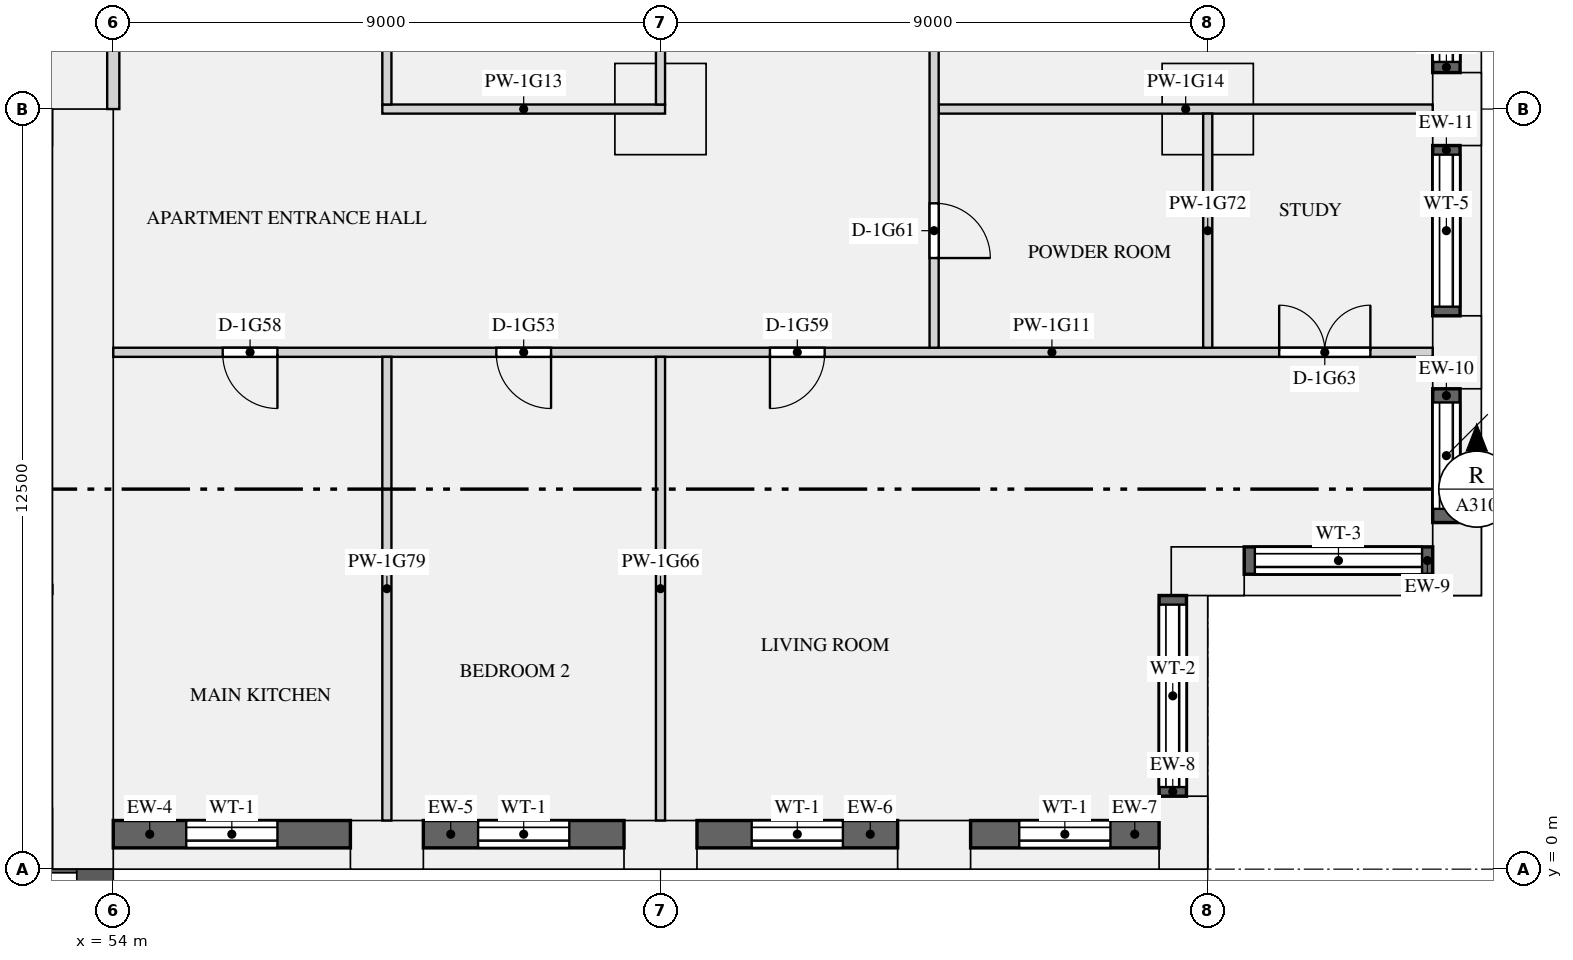
"""IFC4 building model, lengths in metres.
Left out: names, types, materials, properties, quantities, classifications, styles, units other than length and angle.
Written with IfcOpenShell. Run it as: python <this file> out.ifc"""

import sys

from ifc_helpers import new_model, si_unit, direction, frame, frame_2d, origin, origin_2d, place, context, subcontext, project, spatial, rectangle, extrude, element, fill, save


model = new_model("IFC4")
c1 = context("Model", 3, precision=1e-05, world=origin(), true_north=direction((0.0, 1.0)))
c2 = subcontext(c1, "Body", "Model", "MODEL_VIEW")
j1 = project(units=[si_unit("LENGTHUNIT", "METRE"), si_unit("PLANEANGLEUNIT", "RADIAN")], contexts=[c1])
p1 = place(None, origin())
s1 = spatial("IfcSite", under=j1, at=p1, CompositionType="ELEMENT")
p2 = place(p1, origin())
s2 = spatial("IfcBuilding", under=s1, at=p2, CompositionType="ELEMENT")
p3 = place(p2, frame((0.0, 0.0, 69.9)))
s3 = spatial("IfcBuildingStorey", under=s2, at=p3, CompositionType="ELEMENT", Elevation=69.9)
for number, where, z_axis, x_axis in (
    (1, (58.5, 0.4, 0.0), (0.0, 0.0, 1.0), (1.0, 0.0, 0.0)),
    (2, (63.0, 0.4, 0.0), (0.0, 0.0, 1.0), (1.0, 0.0, 0.0)),
    (3, (67.5, 0.4, 0.0), (0.0, 0.0, 1.0), (1.0, 0.0, 0.0)),
    (4, (71.6, 0.6, 0.0), (0.0, 0.0, 1.0), (0.0, 1.0, 0.0)),
    (5, (72.0, 4.9, 0.0), (0.0, 0.0, 1.0), (1.0, 0.0, 0.0)),
    (6, (76.1, 5.1, 0.0), (0.0, 0.0, 1.0), (0.0, 1.0, 0.0)),
    (7, (76.1, 8.5, 0.0), (0.0, 0.0, 1.0), (0.0, 1.0, 0.0)),
    (8, (76.1, 12.5, 0.0), (0.0, 0.0, 1.0), (0.0, 1.0, 0.0)),
):
    element("IfcColumn", number, at=place(p3, frame(where, z_axis=z_axis, x_axis=x_axis)), inside=s3, PredefinedType="USERDEFINED", context=c2, shape_type="SweptSolid", body=[
        extrude(rectangle(XDim=1.2, YDim=0.8, at=origin_2d()), origin(), (0.0, 0.0, 1.0), 3.15),
    ])
for number, where, z_axis, x_axis in (
    (9, (63.0, 12.5, 0.0), (0.0, 0.0, 1.0), (1.0, 0.0, 0.0)),
    (10, (72.0, 12.5, 0.0), (0.0, 0.0, 1.0), (1.0, 0.0, 0.0)),
):
    element("IfcColumn", number, at=place(p3, frame(where, z_axis=z_axis, x_axis=x_axis)), inside=s3, PredefinedType="COLUMN", context=c2, shape_type="SweptSolid", body=[
        extrude(rectangle(XDim=1.5, YDim=1.5, at=origin_2d()), origin(), (0.0, 0.0, 1.0), 3.15),
    ])
p4 = place(p3, frame((53.5, 0.0, 0.0), z_axis=(0.0, 0.0, 1.0), x_axis=(0.0, 1.0, 0.0)))
e11 = element("IfcWall", 11, at=p4, inside=s3, PredefinedType="SHEAR", context=c2, shape_type="SweptSolid", body=[
    extrude(rectangle(XDim=12.5, YDim=1.0, at=frame_2d((6.25, 0.0))), origin(), (0.0, 0.0, 1.0), 3.15),
])
p5 = place(p3, frame((54.0, 0.575, 0.9), z_axis=(0.0, 0.0, 1.0), x_axis=(1.0, 0.0, 0.0)))
e12 = element("IfcWall", 12, at=p5, inside=s3, PredefinedType="SOLIDWALL", context=c2, shape_type="SweptSolid", body=[
    extrude(rectangle(XDim=3.9, YDim=0.45, at=frame_2d((1.95, 0.0))), origin(), (0.0, 0.0, 1.0), 1.75),
])
p6 = place(p5, frame((1.2, 0.0, 0.15)))
e13 = element("IfcOpeningElement", 13, at=p6, cuts=e12, PredefinedType="OPENING", context=c2, shape_type="SweptSolid", body=[
    extrude(rectangle(XDim=1.5, YDim=1.5, at=frame_2d((0.75, 0.75))), frame((0.0, 0.235, 0.0), z_axis=(0.0, -1.0, 0.0), x_axis=(1.0, 0.0, 0.0)), (0.0, 0.0, 1.0), 0.47),
])
p7 = place(p3, frame((59.1, 0.575, 0.9), z_axis=(0.0, 0.0, 1.0), x_axis=(1.0, 0.0, 0.0)))
e14 = element("IfcWall", 14, at=p7, inside=s3, PredefinedType="SOLIDWALL", context=c2, shape_type="SweptSolid", body=[
    extrude(rectangle(XDim=3.3, YDim=0.45, at=frame_2d((1.65, 0.0))), origin(), (0.0, 0.0, 1.0), 1.75),
])
p8 = place(p7, frame((0.9, 0.0, 0.15)))
e15 = element("IfcOpeningElement", 15, at=p8, cuts=e14, PredefinedType="OPENING", context=c2, shape_type="SweptSolid", body=[
    extrude(rectangle(XDim=1.5, YDim=1.5, at=frame_2d((0.75, 0.75))), frame((0.0, 0.235, 0.0), z_axis=(0.0, -1.0, 0.0), x_axis=(1.0, 0.0, 0.0)), (0.0, 0.0, 1.0), 0.47),
])
p9 = place(p3, frame((63.6, 0.575, 0.9), z_axis=(0.0, 0.0, 1.0), x_axis=(1.0, 0.0, 0.0)))
e16 = element("IfcWall", 16, at=p9, inside=s3, PredefinedType="SOLIDWALL", context=c2, shape_type="SweptSolid", body=[
    extrude(rectangle(XDim=3.3, YDim=0.45, at=frame_2d((1.65, 0.0))), origin(), (0.0, 0.0, 1.0), 1.75),
])
p10 = place(p9, frame((0.9, 0.0, 0.15)))
e17 = element("IfcOpeningElement", 17, at=p10, cuts=e16, PredefinedType="OPENING", context=c2, shape_type="SweptSolid", body=[
    extrude(rectangle(XDim=1.5, YDim=1.5, at=frame_2d((0.75, 0.75))), frame((0.0, 0.235, 0.0), z_axis=(0.0, -1.0, 0.0), x_axis=(1.0, 0.0, 0.0)), (0.0, 0.0, 1.0), 0.47),
])
p11 = place(p3, frame((68.1, 0.575, 0.9), z_axis=(0.0, 0.0, 1.0), x_axis=(1.0, 0.0, 0.0)))
e18 = element("IfcWall", 18, at=p11, inside=s3, PredefinedType="SOLIDWALL", context=c2, shape_type="SweptSolid", body=[
    extrude(rectangle(XDim=3.1, YDim=0.45, at=frame_2d((1.55, 0.0))), origin(), (0.0, 0.0, 1.0), 1.75),
])
p12 = place(p11, frame((0.8, 0.0, 0.15)))
e19 = element("IfcOpeningElement", 19, at=p12, cuts=e18, PredefinedType="OPENING", context=c2, shape_type="SweptSolid", body=[
    extrude(rectangle(XDim=1.5, YDim=1.5, at=frame_2d((0.75, 0.75))), frame((0.0, 0.235, 0.0), z_axis=(0.0, -1.0, 0.0), x_axis=(1.0, 0.0, 0.0)), (0.0, 0.0, 1.0), 0.47),
])
p13 = place(p3, frame((71.425, 1.2, 0.9), z_axis=(0.0, 0.0, 1.0), x_axis=(0.0, 1.0, 0.0)))
e20 = element("IfcWall", 20, at=p13, inside=s3, PredefinedType="SOLIDWALL", context=c2, shape_type="SweptSolid", body=[
    extrude(rectangle(XDim=3.3, YDim=0.45, at=frame_2d((1.65, 0.0))), origin(), (0.0, 0.0, 1.0), 1.75),
])
p14 = place(p13, frame((0.15, 0.0, 0.15)))
e21 = element("IfcOpeningElement", 21, at=p14, cuts=e20, PredefinedType="OPENING", context=c2, shape_type="SweptSolid", body=[
    extrude(rectangle(XDim=3.0, YDim=1.5, at=frame_2d((1.5, 0.75))), frame((0.0, 0.235, 0.0), z_axis=(0.0, -1.0, 0.0), x_axis=(1.0, 0.0, 0.0)), (0.0, 0.0, 1.0), 0.47),
])
p15 = place(p3, frame((72.6, 5.075, 0.9), z_axis=(0.0, 0.0, 1.0), x_axis=(1.0, 0.0, 0.0)))
e22 = element("IfcWall", 22, at=p15, inside=s3, PredefinedType="SOLIDWALL", context=c2, shape_type="SweptSolid", body=[
    extrude(rectangle(XDim=3.1, YDim=0.45, at=frame_2d((1.55, 0.0))), origin(), (0.0, 0.0, 1.0), 1.75),
])
p16 = place(p15, frame((0.175, 0.0, 0.15)))
e23 = element("IfcOpeningElement", 23, at=p16, cuts=e22, PredefinedType="OPENING", context=c2, shape_type="SweptSolid", body=[
    extrude(rectangle(XDim=2.75, YDim=1.5, at=frame_2d((1.375, 0.75))), frame((0.0, 0.235, 0.0), z_axis=(0.0, -1.0, 0.0), x_axis=(1.0, 0.0, 0.0)), (0.0, 0.0, 1.0), 0.47),
])
p17 = place(p3, frame((75.925, 5.7, 0.9), z_axis=(0.0, 0.0, 1.0), x_axis=(0.0, 1.0, 0.0)))
e24 = element("IfcWall", 24, at=p17, inside=s3, PredefinedType="SOLIDWALL", context=c2, shape_type="SweptSolid", body=[
    extrude(rectangle(XDim=2.2, YDim=0.45, at=frame_2d((1.1, 0.0))), origin(), (0.0, 0.0, 1.0), 1.75),
])
p18 = place(p17, frame((0.225, 0.0, 0.15)))
e25 = element("IfcOpeningElement", 25, at=p18, cuts=e24, PredefinedType="OPENING", context=c2, shape_type="SweptSolid", body=[
    extrude(rectangle(XDim=1.75, YDim=1.5, at=frame_2d((0.875, 0.75))), frame((0.0, 0.235, 0.0), z_axis=(0.0, -1.0, 0.0), x_axis=(1.0, 0.0, 0.0)), (0.0, 0.0, 1.0), 0.47),
])
p19 = place(p3, frame((75.925, 9.1, 0.9), z_axis=(0.0, 0.0, 1.0), x_axis=(0.0, 1.0, 0.0)))
e26 = element("IfcWall", 26, at=p19, inside=s3, PredefinedType="SOLIDWALL", context=c2, shape_type="SweptSolid", body=[
    extrude(rectangle(XDim=2.8, YDim=0.45, at=frame_2d((1.4, 0.0))), origin(), (0.0, 0.0, 1.0), 1.75),
])
p20 = place(p19, frame((0.15, 0.0, 0.15)))
e27 = element("IfcOpeningElement", 27, at=p20, cuts=e26, PredefinedType="OPENING", context=c2, shape_type="SweptSolid", body=[
    extrude(rectangle(XDim=2.5, YDim=1.5, at=frame_2d((1.25, 0.75))), frame((0.0, 0.235, 0.0), z_axis=(0.0, -1.0, 0.0), x_axis=(1.0, 0.0, 0.0)), (0.0, 0.0, 1.0), 0.47),
])
p21 = place(p3, frame((75.925, 13.1, 0.9), z_axis=(0.0, 0.0, 1.0), x_axis=(0.0, 1.0, 0.0)))
e28 = element("IfcWall", 28, at=p21, inside=s3, PredefinedType="SOLIDWALL", context=c2, shape_type="SweptSolid", body=[
    extrude(rectangle(XDim=2.6, YDim=0.45, at=frame_2d((1.3, 0.0))), origin(), (0.0, 0.0, 1.0), 1.75),
])
p22 = place(p21, frame((0.175, 0.0, 0.15)))
e29 = element("IfcOpeningElement", 29, at=p22, cuts=e28, PredefinedType="OPENING", context=c2, shape_type="SweptSolid", body=[
    extrude(rectangle(XDim=2.25, YDim=1.5, at=frame_2d((1.125, 0.75))), frame((0.0, 0.235, 0.0), z_axis=(0.0, -1.0, 0.0), x_axis=(1.0, 0.0, 0.0)), (0.0, 0.0, 1.0), 0.47),
])
p23 = place(p3, frame((54.0, 12.5, 0.0), z_axis=(0.0, 0.0, 1.0), x_axis=(0.0, 1.0, 0.0)))
e30 = element("IfcWall", 30, at=p23, inside=s3, PredefinedType="PARTITIONING", context=c2, shape_type="SweptSolid", body=[
    extrude(rectangle(XDim=3.4, YDim=0.2, at=frame_2d((1.7, 0.0))), origin(), (0.0, 0.0, 1.0), 2.65),
])
p24 = place(p3, frame((54.0, 8.5, 0.0), z_axis=(0.0, 0.0, 1.0), x_axis=(1.0, 0.0, 0.0)))
e31 = element("IfcWall", 31, at=p24, inside=s3, PredefinedType="PARTITIONING", context=c2, shape_type="SweptSolid", body=[
    extrude(rectangle(XDim=21.7, YDim=0.15, at=frame_2d((10.85, 0.0))), origin(), (0.0, 0.0, 1.0), 2.65),
])
p25 = place(p24, frame((6.3, 0.0, 0.0)))
e32 = element("IfcOpeningElement", 32, at=p25, cuts=e31, PredefinedType="OPENING", context=c2, shape_type="SweptSolid", body=[
    extrude(rectangle(XDim=0.9, YDim=2.1, at=frame_2d((0.45, 1.05))), frame((0.0, 0.085, 0.0), z_axis=(0.0, -1.0, 0.0), x_axis=(1.0, 0.0, 0.0)), (0.0, 0.0, 1.0), 0.17),
])
p26 = place(p24, frame((1.8, 0.0, 0.0)))
e33 = element("IfcOpeningElement", 33, at=p26, cuts=e31, PredefinedType="OPENING", context=c2, shape_type="SweptSolid", body=[
    extrude(rectangle(XDim=0.9, YDim=2.1, at=frame_2d((0.45, 1.05))), frame((0.0, 0.085, 0.0), z_axis=(0.0, -1.0, 0.0), x_axis=(1.0, 0.0, 0.0)), (0.0, 0.0, 1.0), 0.17),
])
p27 = place(p24, frame((10.8, 0.0, 0.0)))
e34 = element("IfcOpeningElement", 34, at=p27, cuts=e31, PredefinedType="OPENING", context=c2, shape_type="SweptSolid", body=[
    extrude(rectangle(XDim=0.9, YDim=2.1, at=frame_2d((0.45, 1.05))), frame((0.0, 0.085, 0.0), z_axis=(0.0, -1.0, 0.0), x_axis=(1.0, 0.0, 0.0)), (0.0, 0.0, 1.0), 0.17),
])
p28 = place(p24, frame((19.175, 0.0, 0.0)))
e35 = element("IfcOpeningElement", 35, at=p28, cuts=e31, PredefinedType="OPENING", context=c2, shape_type="SweptSolid", body=[
    extrude(rectangle(XDim=1.5, YDim=2.1, at=frame_2d((0.75, 1.05))), frame((0.0, 0.085, 0.0), z_axis=(0.0, -1.0, 0.0), x_axis=(1.0, 0.0, 0.0)), (0.0, 0.0, 1.0), 0.17),
])
p29 = place(p3, frame((58.425, 12.5, 0.0), z_axis=(0.0, 0.0, 1.0), x_axis=(1.0, 0.0, 0.0)))
e36 = element("IfcWall", 36, at=p29, inside=s3, PredefinedType="PARTITIONING", context=c2, shape_type="SweptSolid", body=[
    extrude(rectangle(XDim=4.65, YDim=0.15, at=frame_2d((2.325, 0.0))), origin(), (0.0, 0.0, 1.0), 2.65),
])
p30 = place(p3, frame((67.575, 12.5, 0.0), z_axis=(0.0, 0.0, 1.0), x_axis=(1.0, 0.0, 0.0)))
e37 = element("IfcWall", 37, at=p30, inside=s3, PredefinedType="PARTITIONING", context=c2, shape_type="SweptSolid", body=[
    extrude(rectangle(XDim=8.125, YDim=0.15, at=frame_2d((4.062, 0.0))), origin(), (0.0, 0.0, 1.0), 2.65),
])
p31 = place(p3, frame((63.0, 0.8, 0.0), z_axis=(0.0, 0.0, 1.0), x_axis=(0.0, 1.0, 0.0)))
e38 = element("IfcWall", 38, at=p31, inside=s3, PredefinedType="PARTITIONING", context=c2, shape_type="SweptSolid", body=[
    extrude(rectangle(XDim=7.625, YDim=0.15, at=frame_2d((3.812, 0.0))), origin(), (0.0, 0.0, 1.0), 2.65),
])
p32 = place(p3, frame((63.0, 12.575, 0.0), z_axis=(0.0, 0.0, 1.0), x_axis=(0.0, 1.0, 0.0)))
e39 = element("IfcWall", 39, at=p32, inside=s3, PredefinedType="PARTITIONING", context=c2, shape_type="SweptSolid", body=[
    extrude(rectangle(XDim=15.85, YDim=0.15, at=frame_2d((7.925, 0.0))), origin(), (0.0, 0.0, 1.0), 2.65),
])
p33 = place(p32, frame((6.85, 0.0, 0.0)))
e40 = element("IfcOpeningElement", 40, at=p33, cuts=e39, PredefinedType="OPENING", context=c2, shape_type="SweptSolid", body=[
    extrude(rectangle(XDim=0.9, YDim=2.1, at=frame_2d((0.45, 1.05))), frame((0.0, 0.085, 0.0), z_axis=(0.0, -1.0, 0.0), x_axis=(1.0, 0.0, 0.0)), (0.0, 0.0, 1.0), 0.17),
])
p34 = place(p3, frame((72.0, 8.575, 0.0), z_axis=(0.0, 0.0, 1.0), x_axis=(0.0, 1.0, 0.0)))
e41 = element("IfcWall", 41, at=p34, inside=s3, PredefinedType="PARTITIONING", context=c2, shape_type="SweptSolid", body=[
    extrude(rectangle(XDim=3.85, YDim=0.15, at=frame_2d((1.925, 0.0))), origin(), (0.0, 0.0, 1.0), 2.65),
])
p35 = place(p3, frame((67.5, 8.575, 0.0), z_axis=(0.0, 0.0, 1.0), x_axis=(0.0, 1.0, 0.0)))
e42 = element("IfcWall", 42, at=p35, inside=s3, PredefinedType="PARTITIONING", context=c2, shape_type="SweptSolid", body=[
    extrude(rectangle(XDim=15.35, YDim=0.15, at=frame_2d((7.675, 0.0))), origin(), (0.0, 0.0, 1.0), 2.65),
])
p36 = place(p35, frame((7.475, 0.0, 0.0)))
e43 = element("IfcOpeningElement", 43, at=p36, cuts=e42, PredefinedType="OPENING", context=c2, shape_type="SweptSolid", body=[
    extrude(rectangle(XDim=0.9, YDim=2.1, at=frame_2d((0.45, 1.05))), frame((0.0, 0.085, 0.0), z_axis=(0.0, -1.0, 0.0), x_axis=(1.0, 0.0, 0.0)), (0.0, 0.0, 1.0), 0.17),
])
p37 = place(p35, frame((1.475, 0.0, 0.0)))
e44 = element("IfcOpeningElement", 44, at=p37, cuts=e42, PredefinedType="OPENING", context=c2, shape_type="SweptSolid", body=[
    extrude(rectangle(XDim=0.9, YDim=2.1, at=frame_2d((0.45, 1.05))), frame((0.0, 0.085, 0.0), z_axis=(0.0, -1.0, 0.0), x_axis=(1.0, 0.0, 0.0)), (0.0, 0.0, 1.0), 0.17),
])
p38 = place(p3, frame((58.5, 0.8, 0.0), z_axis=(0.0, 0.0, 1.0), x_axis=(0.0, 1.0, 0.0)))
e45 = element("IfcWall", 45, at=p38, inside=s3, PredefinedType="PARTITIONING", context=c2, shape_type="SweptSolid", body=[
    extrude(rectangle(XDim=7.625, YDim=0.15, at=frame_2d((3.812, 0.0))), origin(), (0.0, 0.0, 1.0), 2.65),
])
p39 = place(p3, frame((58.5, 12.575, 0.0), z_axis=(0.0, 0.0, 1.0), x_axis=(0.0, 1.0, 0.0)))
e46 = element("IfcWall", 46, at=p39, inside=s3, PredefinedType="PARTITIONING", context=c2, shape_type="SweptSolid", body=[
    extrude(rectangle(XDim=10.325, YDim=0.15, at=frame_2d((5.163, 0.0))), origin(), (0.0, 0.0, 1.0), 2.65),
])
p40 = place(p39, frame((1.475, 0.0, 0.0)))
e47 = element("IfcOpeningElement", 47, at=p40, cuts=e46, PredefinedType="OPENING", context=c2, shape_type="SweptSolid", body=[
    extrude(rectangle(XDim=0.9, YDim=2.1, at=frame_2d((0.45, 1.05))), frame((0.0, 0.085, 0.0), z_axis=(0.0, -1.0, 0.0), x_axis=(1.0, 0.0, 0.0)), (0.0, 0.0, 1.0), 0.17),
])
p41 = place(p6, origin())
e48 = element("IfcWindow", 48, at=p41, inside=s3, PartitioningType="SINGLE_PANEL", PredefinedType="WINDOW", context=c2, shape_type="SweptSolid", body=[
    extrude(rectangle(XDim=1.5, YDim=1.5, at=frame_2d((0.75, 0.75))), frame((0.0, -0.065, 0.0), z_axis=(0.0, -1.0, 0.0), x_axis=(1.0, 0.0, 0.0)), (0.0, 0.0, 1.0), 0.06),
])
fill(e13, e48)
p42 = place(p8, origin())
e49 = element("IfcWindow", 49, at=p42, inside=s3, PartitioningType="SINGLE_PANEL", PredefinedType="WINDOW", context=c2, shape_type="SweptSolid", body=[
    extrude(rectangle(XDim=1.5, YDim=1.5, at=frame_2d((0.75, 0.75))), frame((0.0, -0.065, 0.0), z_axis=(0.0, -1.0, 0.0), x_axis=(1.0, 0.0, 0.0)), (0.0, 0.0, 1.0), 0.06),
])
fill(e15, e49)
p43 = place(p10, origin())
e50 = element("IfcWindow", 50, at=p43, inside=s3, PartitioningType="SINGLE_PANEL", PredefinedType="WINDOW", context=c2, shape_type="SweptSolid", body=[
    extrude(rectangle(XDim=1.5, YDim=1.5, at=frame_2d((0.75, 0.75))), frame((0.0, -0.065, 0.0), z_axis=(0.0, -1.0, 0.0), x_axis=(1.0, 0.0, 0.0)), (0.0, 0.0, 1.0), 0.06),
])
fill(e17, e50)
p44 = place(p12, origin())
e51 = element("IfcWindow", 51, at=p44, inside=s3, PartitioningType="SINGLE_PANEL", PredefinedType="WINDOW", context=c2, shape_type="SweptSolid", body=[
    extrude(rectangle(XDim=1.5, YDim=1.5, at=frame_2d((0.75, 0.75))), frame((0.0, -0.065, 0.0), z_axis=(0.0, -1.0, 0.0), x_axis=(1.0, 0.0, 0.0)), (0.0, 0.0, 1.0), 0.06),
])
fill(e19, e51)
p45 = place(p14, origin())
e52 = element("IfcWindow", 52, at=p45, inside=s3, PartitioningType="SINGLE_PANEL", PredefinedType="WINDOW", context=c2, shape_type="SweptSolid", body=[
    extrude(rectangle(XDim=3.0, YDim=1.5, at=frame_2d((1.5, 0.75))), frame((0.0, -0.065, 0.0), z_axis=(0.0, -1.0, 0.0), x_axis=(1.0, 0.0, 0.0)), (0.0, 0.0, 1.0), 0.06),
])
fill(e21, e52)
p46 = place(p16, origin())
e53 = element("IfcWindow", 53, at=p46, inside=s3, PartitioningType="SINGLE_PANEL", PredefinedType="WINDOW", context=c2, shape_type="SweptSolid", body=[
    extrude(rectangle(XDim=2.75, YDim=1.5, at=frame_2d((1.375, 0.75))), frame((0.0, -0.065, 0.0), z_axis=(0.0, -1.0, 0.0), x_axis=(1.0, 0.0, 0.0)), (0.0, 0.0, 1.0), 0.06),
])
fill(e23, e53)
p47 = place(p18, origin())
e54 = element("IfcWindow", 54, at=p47, inside=s3, PartitioningType="SINGLE_PANEL", PredefinedType="WINDOW", context=c2, shape_type="SweptSolid", body=[
    extrude(rectangle(XDim=1.75, YDim=1.5, at=frame_2d((0.875, 0.75))), frame((0.0, -0.065, 0.0), z_axis=(0.0, -1.0, 0.0), x_axis=(1.0, 0.0, 0.0)), (0.0, 0.0, 1.0), 0.06),
])
fill(e25, e54)
p48 = place(p20, origin())
e55 = element("IfcWindow", 55, at=p48, inside=s3, PartitioningType="SINGLE_PANEL", PredefinedType="WINDOW", context=c2, shape_type="SweptSolid", body=[
    extrude(rectangle(XDim=2.5, YDim=1.5, at=frame_2d((1.25, 0.75))), frame((0.0, -0.065, 0.0), z_axis=(0.0, -1.0, 0.0), x_axis=(1.0, 0.0, 0.0)), (0.0, 0.0, 1.0), 0.06),
])
fill(e27, e55)
p49 = place(p22, origin())
e56 = element("IfcWindow", 56, at=p49, inside=s3, PartitioningType="SINGLE_PANEL", PredefinedType="WINDOW", context=c2, shape_type="SweptSolid", body=[
    extrude(rectangle(XDim=2.25, YDim=1.5, at=frame_2d((1.125, 0.75))), frame((0.0, -0.065, 0.0), z_axis=(0.0, -1.0, 0.0), x_axis=(1.0, 0.0, 0.0)), (0.0, 0.0, 1.0), 0.06),
])
fill(e29, e56)
p50 = place(p25, frame((0.9, 0.0, 0.0), z_axis=(0.0, 0.0, 1.0), x_axis=(-1.0, 0.0, 0.0)))
e57 = element("IfcDoor", 57, at=p50, inside=s3, OperationType="SINGLE_SWING_LEFT", PredefinedType="DOOR", context=c2, shape_type="SweptSolid", body=[
    extrude(rectangle(XDim=0.9, YDim=2.1, at=frame_2d((0.45, 1.05))), frame((0.0, 0.025, 0.0), z_axis=(0.0, -1.0, 0.0), x_axis=(1.0, 0.0, 0.0)), (0.0, 0.0, 1.0), 0.05),
])
fill(e32, e57)
p51 = place(p26, frame((0.9, 0.0, 0.0), z_axis=(0.0, 0.0, 1.0), x_axis=(-1.0, 0.0, 0.0)))
e58 = element("IfcDoor", 58, at=p51, inside=s3, OperationType="SINGLE_SWING_LEFT", PredefinedType="DOOR", context=c2, shape_type="SweptSolid", body=[
    extrude(rectangle(XDim=0.9, YDim=2.1, at=frame_2d((0.45, 1.05))), frame((0.0, 0.025, 0.0), z_axis=(0.0, -1.0, 0.0), x_axis=(1.0, 0.0, 0.0)), (0.0, 0.0, 1.0), 0.05),
])
fill(e33, e58)
p52 = place(p27, frame((0.9, 0.0, 0.0), z_axis=(0.0, 0.0, 1.0), x_axis=(-1.0, 0.0, 0.0)))
e59 = element("IfcDoor", 59, at=p52, inside=s3, OperationType="SINGLE_SWING_RIGHT", PredefinedType="DOOR", context=c2, shape_type="SweptSolid", body=[
    extrude(rectangle(XDim=0.9, YDim=2.1, at=frame_2d((0.45, 1.05))), frame((0.0, 0.025, 0.0), z_axis=(0.0, -1.0, 0.0), x_axis=(1.0, 0.0, 0.0)), (0.0, 0.0, 1.0), 0.05),
])
fill(e34, e59)
p53 = place(p37, frame((0.9, 0.0, 0.0), z_axis=(0.0, 0.0, 1.0), x_axis=(-1.0, 0.0, 0.0)))
e60 = element("IfcDoor", 60, at=p53, inside=s3, OperationType="SINGLE_SWING_RIGHT", PredefinedType="DOOR", context=c2, shape_type="SweptSolid", body=[
    extrude(rectangle(XDim=0.9, YDim=2.1, at=frame_2d((0.45, 1.05))), frame((0.0, 0.025, 0.0), z_axis=(0.0, -1.0, 0.0), x_axis=(1.0, 0.0, 0.0)), (0.0, 0.0, 1.0), 0.05),
])
fill(e44, e60)
p54 = place(p28, origin())
e61 = element("IfcDoor", 61, at=p54, inside=s3, OperationType="DOUBLE_DOOR_SINGLE_SWING", PredefinedType="DOOR", context=c2, shape_type="SweptSolid", body=[
    extrude(rectangle(XDim=1.5, YDim=2.1, at=frame_2d((0.75, 1.05))), frame((0.0, 0.025, 0.0), z_axis=(0.0, -1.0, 0.0), x_axis=(1.0, 0.0, 0.0)), (0.0, 0.0, 1.0), 0.05),
])
fill(e35, e61)
save(model, sys.argv[1])
